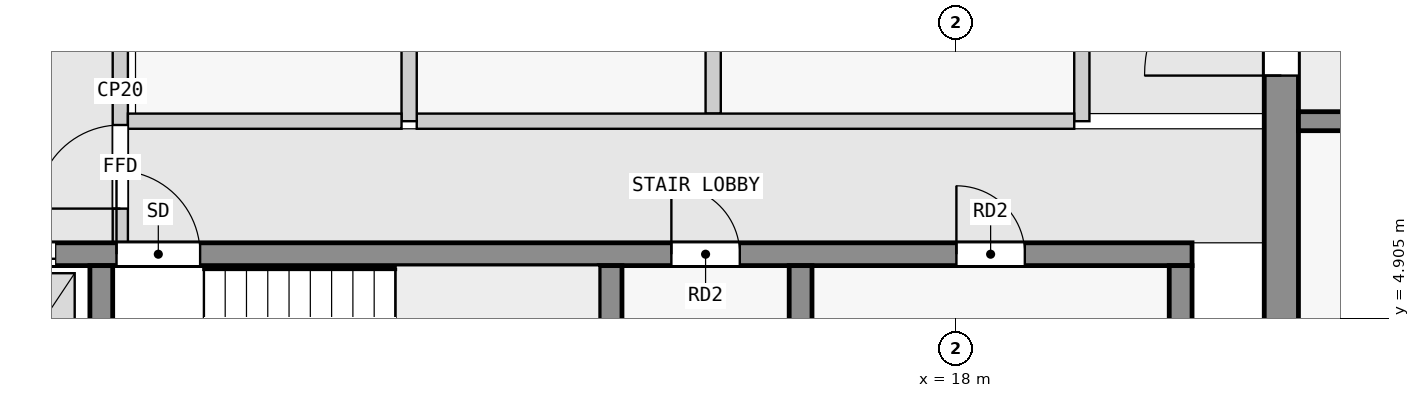
"""IFC4 building model, lengths in metres.
Left out: names, types, materials, properties, quantities, classifications, styles, units other than length and angle.
Written with IfcOpenShell. Run it as: python <this file> out.ifc"""

import sys

from ifc_helpers import new_model, si_unit, direction, frame, frame_2d, origin, place, context, subcontext, project, spatial, rectangle, extrude, element, fill, save


model = new_model("IFC4")
c1 = context("Model", 3, precision=1e-05, world=origin(), true_north=direction((0.0, 1.0)))
c2 = subcontext(c1, "Body", "Model", "MODEL_VIEW")
j1 = project(units=[si_unit("LENGTHUNIT", "METRE"), si_unit("PLANEANGLEUNIT", "RADIAN")], contexts=[c1])
p1 = place(None, origin())
s1 = spatial("IfcSite", under=j1, at=p1, CompositionType="ELEMENT")
p2 = place(p1, origin())
s2 = spatial("IfcBuilding", under=s1, at=p2, CompositionType="ELEMENT")
p3 = place(p2, frame((0.0, 0.0, 266.9)))
s3 = spatial("IfcBuildingStorey", under=s2, at=p3, CompositionType="ELEMENT", Elevation=266.9)
p4 = place(p3, frame((22.275, 2.5, 0.0), z_axis=(0.0, 0.0, 1.0), x_axis=(0.0, 1.0, 0.0)))
e1 = element("IfcWall", 1, at=p4, inside=s3, PredefinedType="SHEAR", context=c2, shape_type="SweptSolid", body=[
    extrude(rectangle(XDim=15.05, YDim=0.45, at=frame_2d((7.525, 0.0))), origin(), (0.0, 0.0, 1.0), 3.25),
])
p5 = place(p4, frame((5.6, 0.0, 0.0)))
e2 = element("IfcOpeningElement", 2, at=p5, cuts=e1, PredefinedType="OPENING", context=c2, shape_type="SweptSolid", body=[
    extrude(rectangle(XDim=1.8, YDim=2.1, at=frame_2d((0.9, 1.05))), frame((0.0, 0.235, 0.0), z_axis=(0.0, -1.0, 0.0), x_axis=(1.0, 0.0, 0.0)), (0.0, 0.0, 1.0), 0.47),
])
for number, where, z_axis, x_axis in (
    (3, (6.75, 2.8, 0.0), (0.0, 0.0, 1.0), (0.0, 1.0, 0.0)),
    (4, (13.45, 2.8, 0.0), (0.0, 0.0, 1.0), (0.0, 1.0, 0.0)),
    (5, (15.95, 2.8, 0.0), (0.0, 0.0, 1.0), (0.0, 1.0, 0.0)),
    (6, (20.95, 2.8, 0.0), (0.0, 0.0, 1.0), (0.0, 1.0, 0.0)),
):
    element("IfcWall", number, at=place(p3, frame(where, z_axis=z_axis, x_axis=x_axis)), inside=s3, PredefinedType="SHEAR", context=c2, shape_type="SweptSolid", body=[
        extrude(rectangle(XDim=2.8, YDim=0.3, at=frame_2d((1.4, 0.0))), origin(), (0.0, 0.0, 1.0), 3.25),
    ])
p6 = place(p3, frame((2.3, 5.75, 0.0), z_axis=(0.0, 0.0, 1.0), x_axis=(1.0, 0.0, 0.0)))
e7 = element("IfcWall", 7, at=p6, inside=s3, PredefinedType="SHEAR", context=c2, shape_type="SweptSolid", body=[
    extrude(rectangle(XDim=18.8, YDim=0.3, at=frame_2d((9.4, 0.0))), origin(), (0.0, 0.0, 1.0), 3.25),
])
p7 = place(p6, frame((4.65, 0.0, 0.0)))
e8 = element("IfcOpeningElement", 8, at=p7, cuts=e7, PredefinedType="OPENING", context=c2, shape_type="SweptSolid", body=[
    extrude(rectangle(XDim=1.1, YDim=2.1, at=frame_2d((0.55, 1.05))), frame((0.0, 0.16, 0.0), z_axis=(0.0, -1.0, 0.0), x_axis=(1.0, 0.0, 0.0)), (0.0, 0.0, 1.0), 0.32),
])
p8 = place(p6, frame((0.45, 0.0, 0.0)))
e9 = element("IfcOpeningElement", 9, at=p8, cuts=e7, PredefinedType="OPENING", context=c2, shape_type="SweptSolid", body=[
    extrude(rectangle(XDim=1.1, YDim=2.1, at=frame_2d((0.55, 1.05))), frame((0.0, 0.16, 0.0), z_axis=(0.0, -1.0, 0.0), x_axis=(1.0, 0.0, 0.0)), (0.0, 0.0, 1.0), 0.32),
])
p9 = place(p6, frame((2.75, 0.0, 0.0)))
e10 = element("IfcOpeningElement", 10, at=p9, cuts=e7, PredefinedType="OPENING", context=c2, shape_type="SweptSolid", body=[
    extrude(rectangle(XDim=1.1, YDim=2.1, at=frame_2d((0.55, 1.05))), frame((0.0, 0.16, 0.0), z_axis=(0.0, -1.0, 0.0), x_axis=(1.0, 0.0, 0.0)), (0.0, 0.0, 1.0), 0.32),
])
p10 = place(p6, frame((11.95, 0.0, 0.0)))
e11 = element("IfcOpeningElement", 11, at=p10, cuts=e7, PredefinedType="OPENING", context=c2, shape_type="SweptSolid", body=[
    extrude(rectangle(XDim=0.9, YDim=2.1, at=frame_2d((0.45, 1.05))), frame((0.0, 0.16, 0.0), z_axis=(0.0, -1.0, 0.0), x_axis=(1.0, 0.0, 0.0)), (0.0, 0.0, 1.0), 0.32),
])
p11 = place(p6, frame((15.7, 0.0, 0.0)))
e12 = element("IfcOpeningElement", 12, at=p11, cuts=e7, PredefinedType="OPENING", context=c2, shape_type="SweptSolid", body=[
    extrude(rectangle(XDim=0.9, YDim=2.1, at=frame_2d((0.45, 1.05))), frame((0.0, 0.16, 0.0), z_axis=(0.0, -1.0, 0.0), x_axis=(1.0, 0.0, 0.0)), (0.0, 0.0, 1.0), 0.32),
])
p12 = place(p3, frame((22.5, 7.5, 0.0), z_axis=(0.0, 0.0, 1.0), x_axis=(1.0, 0.0, 0.0)))
e13 = element("IfcWall", 13, at=p12, inside=s3, PredefinedType="SHEAR", context=c2, shape_type="SweptSolid", body=[
    extrude(rectangle(XDim=22.5, YDim=0.25, at=frame_2d((11.25, 0.0))), origin(), (0.0, 0.0, 1.0), 3.25),
])
p13 = place(p12, frame((1.75, 0.0, 0.0)))
e14 = element("IfcOpeningElement", 14, at=p13, cuts=e13, PredefinedType="OPENING", context=c2, shape_type="SweptSolid", body=[
    extrude(rectangle(XDim=1.0, YDim=2.1, at=frame_2d((0.5, 1.05))), frame((0.0, 0.135, 0.0), z_axis=(0.0, -1.0, 0.0), x_axis=(1.0, 0.0, 0.0)), (0.0, 0.0, 1.0), 0.27),
])
p14 = place(p12, frame((6.25, 0.0, 0.0)))
e15 = element("IfcOpeningElement", 15, at=p14, cuts=e13, PredefinedType="OPENING", context=c2, shape_type="SweptSolid", body=[
    extrude(rectangle(XDim=1.0, YDim=2.1, at=frame_2d((0.5, 1.05))), frame((0.0, 0.135, 0.0), z_axis=(0.0, -1.0, 0.0), x_axis=(1.0, 0.0, 0.0)), (0.0, 0.0, 1.0), 0.27),
])
p15 = place(p12, frame((10.35, 0.0, 0.0)))
e16 = element("IfcOpeningElement", 16, at=p15, cuts=e13, PredefinedType="OPENING", context=c2, shape_type="SweptSolid", body=[
    extrude(rectangle(XDim=1.8, YDim=2.1, at=frame_2d((0.9, 1.05))), frame((0.0, 0.135, 0.0), z_axis=(0.0, -1.0, 0.0), x_axis=(1.0, 0.0, 0.0)), (0.0, 0.0, 1.0), 0.27),
])
p16 = place(p12, frame((15.25, 0.0, 0.0)))
e17 = element("IfcOpeningElement", 17, at=p16, cuts=e13, PredefinedType="OPENING", context=c2, shape_type="SweptSolid", body=[
    extrude(rectangle(XDim=1.0, YDim=2.1, at=frame_2d((0.5, 1.05))), frame((0.0, 0.135, 0.0), z_axis=(0.0, -1.0, 0.0), x_axis=(1.0, 0.0, 0.0)), (0.0, 0.0, 1.0), 0.27),
])
p17 = place(p12, frame((18.75, 0.0, 0.0)))
e18 = element("IfcOpeningElement", 18, at=p17, cuts=e13, PredefinedType="OPENING", context=c2, shape_type="SweptSolid", body=[
    extrude(rectangle(XDim=0.9, YDim=2.1, at=frame_2d((0.45, 1.05))), frame((0.0, 0.135, 0.0), z_axis=(0.0, -1.0, 0.0), x_axis=(1.0, 0.0, 0.0)), (0.0, 0.0, 1.0), 0.27),
])
p18 = place(p12, frame((20.95, 0.0, 0.0)))
e19 = element("IfcOpeningElement", 19, at=p18, cuts=e13, PredefinedType="OPENING", context=c2, shape_type="SweptSolid", body=[
    extrude(rectangle(XDim=1.0, YDim=2.1, at=frame_2d((0.5, 1.05))), frame((0.0, 0.135, 0.0), z_axis=(0.0, -1.0, 0.0), x_axis=(1.0, 0.0, 0.0)), (0.0, 0.0, 1.0), 0.27),
])
p19 = place(p3, frame((7.0, 5.9, 0.0), z_axis=(0.0, 0.0, 1.0), x_axis=(0.0, 1.0, 0.0)))
e20 = element("IfcWall", 20, at=p19, inside=s3, PredefinedType="PARTITIONING", context=c2, shape_type="SweptSolid", body=[
    extrude(rectangle(XDim=4.0, YDim=0.2, at=frame_2d((2.0, 0.0))), origin(), (0.0, 0.0, 1.0), 3.25),
])
p20 = place(p19, frame((0.45, 0.0, 0.0)))
e21 = element("IfcOpeningElement", 21, at=p20, cuts=e20, PredefinedType="OPENING", context=c2, shape_type="SweptSolid", body=[
    extrude(rectangle(XDim=1.1, YDim=2.1, at=frame_2d((0.55, 1.05))), frame((0.0, 0.11, 0.0), z_axis=(0.0, -1.0, 0.0), x_axis=(1.0, 0.0, 0.0)), (0.0, 0.0, 1.0), 0.22),
])
p21 = place(p3, frame((7.1, 7.5, 0.0), z_axis=(0.0, 0.0, 1.0), x_axis=(1.0, 0.0, 0.0)))
e22 = element("IfcWall", 22, at=p21, inside=s3, PredefinedType="PARTITIONING", context=c2, shape_type="SweptSolid", body=[
    extrude(rectangle(XDim=3.6, YDim=0.2, at=frame_2d((1.8, 0.0))), origin(), (0.0, 0.0, 1.0), 3.25),
])
p22 = place(p3, frame((10.8, 7.5, 0.0), z_axis=(0.0, 0.0, 1.0), x_axis=(0.0, 1.0, 0.0)))
e23 = element("IfcWall", 23, at=p22, inside=s3, PredefinedType="PARTITIONING", context=c2, shape_type="SweptSolid", body=[
    extrude(rectangle(XDim=4.7, YDim=0.2, at=frame_2d((2.35, 0.0))), origin(), (0.0, 0.0, 1.0), 3.25),
])
p23 = place(p3, frame((10.9, 7.5, 0.0), z_axis=(0.0, 0.0, 1.0), x_axis=(1.0, 0.0, 0.0)))
e24 = element("IfcWall", 24, at=p23, inside=s3, PredefinedType="PARTITIONING", context=c2, shape_type="SweptSolid", body=[
    extrude(rectangle(XDim=8.65, YDim=0.2, at=frame_2d((4.325, 0.0))), origin(), (0.0, 0.0, 1.0), 3.25),
])
p24 = place(p3, frame((19.65, 7.5, 0.0), z_axis=(0.0, 0.0, 1.0), x_axis=(0.0, 1.0, 0.0)))
e25 = element("IfcWall", 25, at=p24, inside=s3, PredefinedType="PARTITIONING", context=c2, shape_type="SweptSolid", body=[
    extrude(rectangle(XDim=4.7, YDim=0.2, at=frame_2d((2.35, 0.0))), origin(), (0.0, 0.0, 1.0), 3.25),
])
p25 = place(p3, frame((14.8, 7.6, 0.0), z_axis=(0.0, 0.0, 1.0), x_axis=(0.0, 1.0, 0.0)))
e26 = element("IfcWall", 26, at=p25, inside=s3, PredefinedType="PARTITIONING", context=c2, shape_type="SweptSolid", body=[
    extrude(rectangle(XDim=4.5, YDim=0.2, at=frame_2d((2.25, 0.0))), origin(), (0.0, 0.0, 1.0), 3.25),
])
p26 = place(p20, origin())
e27 = element("IfcDoor", 27, at=p26, inside=s3, OperationType="SINGLE_SWING_LEFT", PredefinedType="DOOR", context=c2, shape_type="SweptSolid", body=[
    extrude(rectangle(XDim=1.1, YDim=2.1, at=frame_2d((0.55, 1.05))), frame((0.0, 0.025, 0.0), z_axis=(0.0, -1.0, 0.0), x_axis=(1.0, 0.0, 0.0)), (0.0, 0.0, 1.0), 0.05),
])
fill(e21, e27)
p27 = place(p7, origin())
e28 = element("IfcDoor", 28, at=p27, inside=s3, OperationType="SINGLE_SWING_LEFT", PredefinedType="DOOR", context=c2, shape_type="SweptSolid", body=[
    extrude(rectangle(XDim=1.1, YDim=2.1, at=frame_2d((0.55, 1.05))), frame((0.0, 0.025, 0.0), z_axis=(0.0, -1.0, 0.0), x_axis=(1.0, 0.0, 0.0)), (0.0, 0.0, 1.0), 0.05),
])
fill(e8, e28)
p28 = place(p9, origin())
e29 = element("IfcDoor", 29, at=p28, inside=s3, OperationType="DOUBLE_DOOR_SLIDING", PredefinedType="DOOR", context=c2, shape_type="SweptSolid", body=[
    extrude(rectangle(XDim=1.1, YDim=2.1, at=frame_2d((0.55, 1.05))), frame((0.0, 0.025, 0.0), z_axis=(0.0, -1.0, 0.0), x_axis=(1.0, 0.0, 0.0)), (0.0, 0.0, 1.0), 0.05),
])
fill(e10, e29)
p29 = place(p5, origin())
e30 = element("IfcDoor", 30, at=p29, inside=s3, OperationType="DOUBLE_DOOR_SINGLE_SWING", PredefinedType="DOOR", context=c2, shape_type="SweptSolid", body=[
    extrude(rectangle(XDim=1.8, YDim=2.1, at=frame_2d((0.9, 1.05))), frame((0.0, 0.025, 0.0), z_axis=(0.0, -1.0, 0.0), x_axis=(1.0, 0.0, 0.0)), (0.0, 0.0, 1.0), 0.05),
])
fill(e2, e30)
p30 = place(p10, origin())
e31 = element("IfcDoor", 31, at=p30, inside=s3, OperationType="SINGLE_SWING_LEFT", PredefinedType="DOOR", context=c2, shape_type="SweptSolid", body=[
    extrude(rectangle(XDim=0.9, YDim=2.1, at=frame_2d((0.45, 1.05))), frame((0.0, 0.025, 0.0), z_axis=(0.0, -1.0, 0.0), x_axis=(1.0, 0.0, 0.0)), (0.0, 0.0, 1.0), 0.05),
])
fill(e11, e31)
p31 = place(p11, origin())
e32 = element("IfcDoor", 32, at=p31, inside=s3, OperationType="SINGLE_SWING_LEFT", PredefinedType="DOOR", context=c2, shape_type="SweptSolid", body=[
    extrude(rectangle(XDim=0.9, YDim=2.1, at=frame_2d((0.45, 1.05))), frame((0.0, 0.025, 0.0), z_axis=(0.0, -1.0, 0.0), x_axis=(1.0, 0.0, 0.0)), (0.0, 0.0, 1.0), 0.05),
])
fill(e12, e32)
save(model, sys.argv[1])
